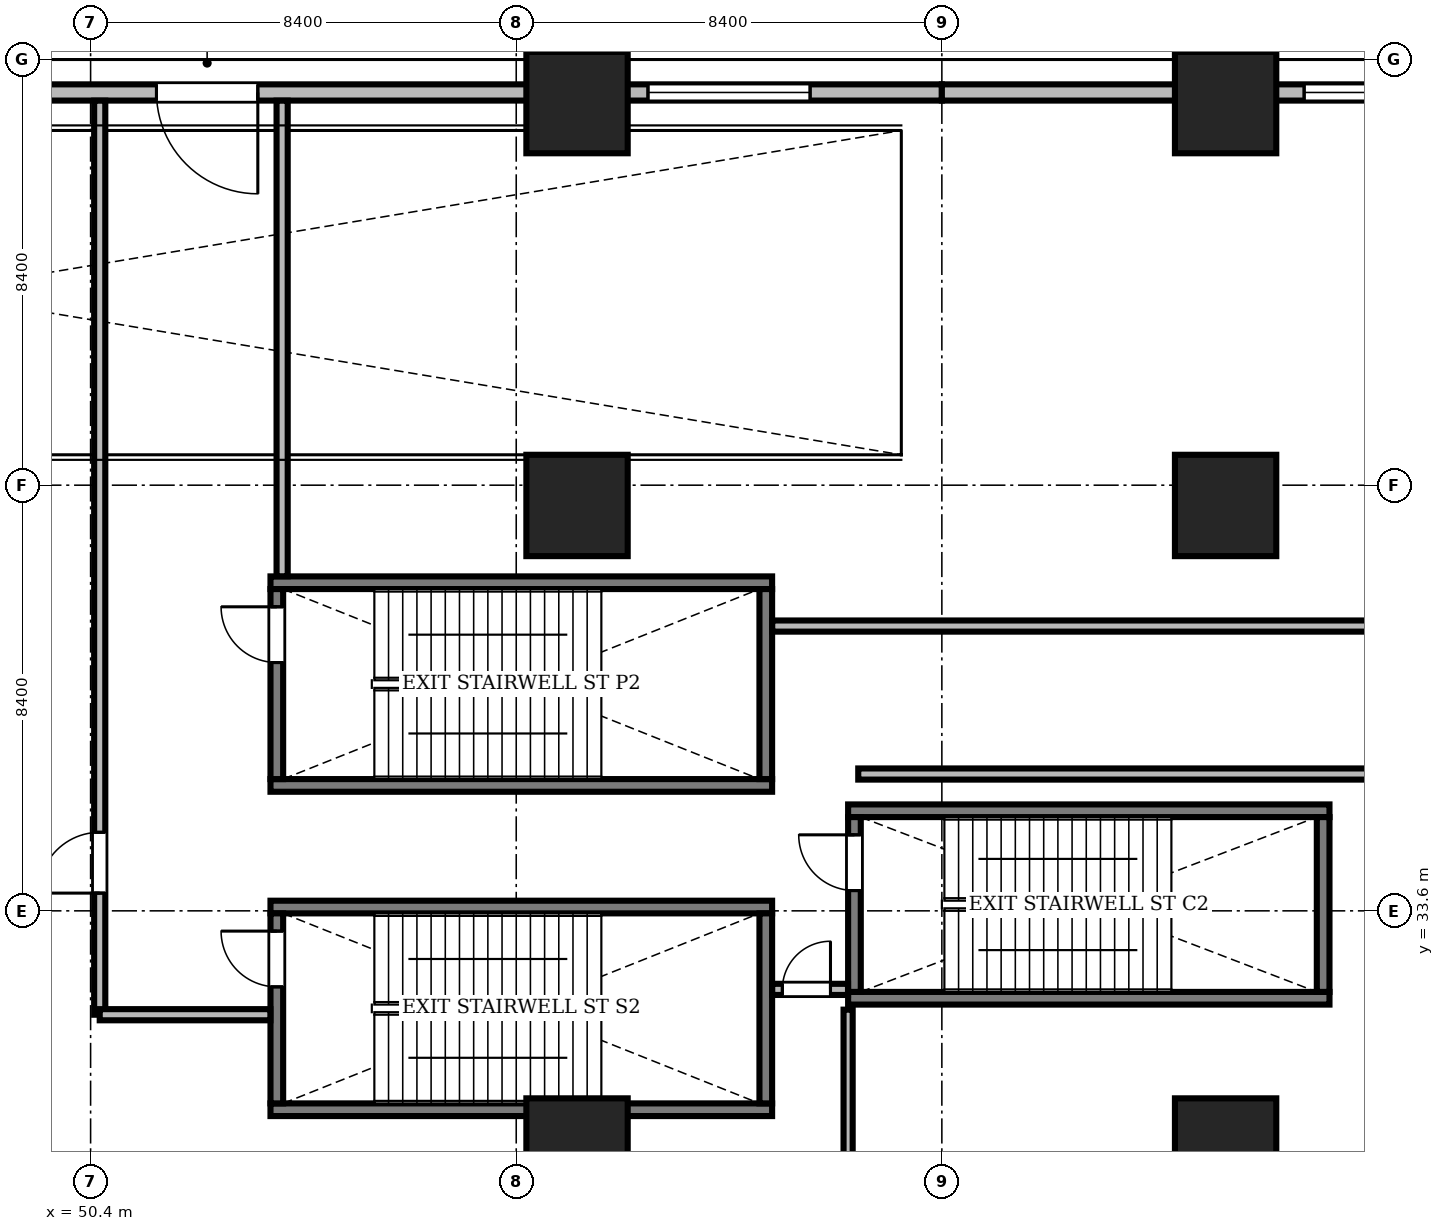
"""IFC4 building model, lengths in metres.
Left out: names, types, materials, properties, quantities, classifications, styles, units other than length and angle.
Written with IfcOpenShell. Run it as: python <this file> out.ifc"""

import sys

from ifc_helpers import new_model, si_unit, direction, frame, frame_2d, origin, origin_2d, place, context, subcontext, project, spatial, rectangle, extrude, source, transform, mapped, element, fill, save


model = new_model("IFC4")
c1 = context("Model", 3, precision=1e-05, world=origin(), true_north=direction((0.0, 1.0)))
c2 = subcontext(c1, "Body", "Model", "MODEL_VIEW")
j1 = project(units=[si_unit("LENGTHUNIT", "METRE"), si_unit("PLANEANGLEUNIT", "RADIAN")], contexts=[c1])
p1 = place(None, origin())
s1 = spatial("IfcSite", under=j1, at=p1, CompositionType="ELEMENT")
p2 = place(p1, origin())
s2 = spatial("IfcBuilding", under=s1, at=p2, CompositionType="ELEMENT")
p3 = place(p2, origin())
s3 = spatial("IfcBuildingStorey", under=s2, at=p3, CompositionType="ELEMENT", Elevation=0.0)
m1 = source(origin(), c2, "Body", "SweptSolid", [
    extrude(rectangle(XDim=2.0, YDim=2.0, at=origin_2d()), origin(), (0.0, 0.0, 1.0), 5.68),
])
for number, where, z_axis, x_axis in (
    (1, (60.0, 28.9, 0.0), (0.0, 0.0, 1.0), (1.0, 0.0, 0.0)),
    (2, (72.8, 28.9, 0.0), (0.0, 0.0, 1.0), (1.0, 0.0, 0.0)),
    (3, (60.0, 41.6, 0.0), (0.0, 0.0, 1.0), (1.0, 0.0, 0.0)),
    (4, (72.8, 41.6, 0.0), (0.0, 0.0, 1.0), (1.0, 0.0, 0.0)),
    (5, (60.0, 49.55, 0.0), (0.0, 0.0, 1.0), (1.0, 0.0, 0.0)),
    (6, (72.8, 49.55, 0.0), (0.0, 0.0, 1.0), (1.0, 0.0, 0.0)),
):
    element("IfcColumn", number, at=place(p3, frame(where, z_axis=z_axis, x_axis=x_axis)), inside=s3, PredefinedType="COLUMN", context=c2, shape_type="MappedRepresentation", body=[
        mapped(m1, transform((0.0, 0.0, 0.0), scale=1.0)),
    ])
m2 = source(origin(), c2, "Body", "SweptSolid", [
    extrude(rectangle(XDim=40.0, YDim=0.32, at=frame_2d((20.0, 0.0))), origin(), (0.0, 0.0, 1.0), 5.151),
])
p4 = place(p3, frame((67.2, 49.75, 0.0), z_axis=(0.0, 0.0, 1.0), x_axis=(-1.0, 0.0, 0.0)))
e7 = element("IfcWall", 7, at=p4, inside=s3, PredefinedType="SOLIDWALL", context=c2, shape_type="MappedRepresentation", body=[
    mapped(m2, transform((0.0, 0.0, 0.0), scale=1.0)),
])
m3 = source(origin(), c2, "Body", "SweptSolid", [
    extrude(rectangle(XDim=2.0, YDim=2.6, at=frame_2d((1.0, 1.3))), frame((0.0, 0.17, 0.0), z_axis=(0.0, -1.0, 0.0), x_axis=(1.0, 0.0, 0.0)), (0.0, 0.0, 1.0), 0.34),
])
p5 = place(p4, frame((13.5, 0.0, 0.0)))
e8 = element("IfcOpeningElement", 8, at=p5, cuts=e7, PredefinedType="OPENING", context=c2, shape_type="MappedRepresentation", body=[
    mapped(m3, transform((0.0, 0.0, 0.0), scale=1.0)),
])
m4 = source(origin(), c2, "Body", "SweptSolid", [
    extrude(rectangle(XDim=3.2, YDim=3.4, at=frame_2d((1.6, 1.7))), frame((0.0, 0.17, 0.0), z_axis=(0.0, -1.0, 0.0), x_axis=(1.0, 0.0, 0.0)), (0.0, 0.0, 1.0), 0.34),
])
p6 = place(p4, frame((2.6, 0.0, 0.85)))
e9 = element("IfcOpeningElement", 9, at=p6, cuts=e7, PredefinedType="OPENING", context=c2, shape_type="MappedRepresentation", body=[
    mapped(m4, transform((0.0, 0.0, 0.0), scale=1.0)),
])
m5 = source(origin(), c2, "Body", "SweptSolid", [
    extrude(rectangle(XDim=16.15, YDim=0.32, at=frame_2d((8.075, 0.0))), origin(), (0.0, 0.0, 1.0), 5.151),
])
p7 = place(p3, frame((83.35, 49.75, 0.0), z_axis=(0.0, 0.0, 1.0), x_axis=(-1.0, 0.0, 0.0)))
e10 = element("IfcWall", 10, at=p7, inside=s3, PredefinedType="SOLIDWALL", context=c2, shape_type="MappedRepresentation", body=[
    mapped(m5, transform((0.0, 0.0, 0.0), scale=1.0)),
])
p8 = place(p7, frame((3.2, 0.0, 0.0)))
e11 = element("IfcOpeningElement", 11, at=p8, cuts=e10, PredefinedType="OPENING", context=c2, shape_type="MappedRepresentation", body=[
    mapped(m3, transform((0.0, 0.0, 0.0), scale=1.0)),
])
p9 = place(p7, frame((5.8, 0.0, 0.85)))
e12 = element("IfcOpeningElement", 12, at=p9, cuts=e10, PredefinedType="OPENING", context=c2, shape_type="MappedRepresentation", body=[
    mapped(m4, transform((0.0, 0.0, 0.0), scale=1.0)),
])
m6 = source(origin(), c2, "Body", "SweptSolid", [
    extrude(rectangle(XDim=9.9, YDim=0.25, at=frame_2d((4.95, 0.0))), origin(), (0.0, 0.0, 1.0), 5.8),
])
for number, where, z_axis, x_axis in (
    (13, (53.95, 29.675, 0.0), (0.0, 0.0, 1.0), (1.0, 0.0, 0.0)),
    (14, (53.95, 33.675, 0.0), (0.0, 0.0, 1.0), (1.0, 0.0, 0.0)),
):
    element("IfcWall", number, at=place(p3, frame(where, z_axis=z_axis, x_axis=x_axis)), inside=s3, PredefinedType="SOLIDWALL", context=c2, shape_type="MappedRepresentation", body=[
        mapped(m6, transform((0.0, 0.0, 0.0), scale=1.0)),
    ])
m7 = source(origin(), c2, "Body", "SweptSolid", [
    extrude(rectangle(XDim=3.75, YDim=0.25, at=frame_2d((1.875, 0.0))), origin(), (0.0, 0.0, 1.0), 5.8),
])
p10 = place(p3, frame((63.725, 29.8, 0.0), z_axis=(0.0, 0.0, 1.0), x_axis=(0.0, 1.0, 0.0)))
e15 = element("IfcWall", 15, at=p10, inside=s3, PredefinedType="SOLIDWALL", context=c2, shape_type="MappedRepresentation", body=[
    mapped(m7, transform((0.0, 0.0, 0.0), scale=1.0)),
])
p11 = place(p3, frame((54.075, 29.8, 0.0), z_axis=(0.0, 0.0, 1.0), x_axis=(0.0, 1.0, 0.0)))
e16 = element("IfcWall", 16, at=p11, inside=s3, PredefinedType="SOLIDWALL", context=c2, shape_type="MappedRepresentation", body=[
    mapped(m7, transform((0.0, 0.0, 0.0), scale=1.0)),
])
m8 = source(origin(), c2, "Body", "SweptSolid", [
    extrude(rectangle(XDim=1.1, YDim=2.2, at=frame_2d((0.55, 1.1))), frame((0.0, 0.135, 0.0), z_axis=(0.0, -1.0, 0.0), x_axis=(1.0, 0.0, 0.0)), (0.0, 0.0, 1.0), 0.27),
])
p12 = place(p11, frame((2.3, 0.0, 0.0)))
e17 = element("IfcOpeningElement", 17, at=p12, cuts=e16, PredefinedType="OPENING", context=c2, shape_type="MappedRepresentation", body=[
    mapped(m8, transform((0.0, 0.0, 0.0), scale=1.0)),
])
for number, where, z_axis, x_axis in (
    (18, (53.95, 36.075, 0.0), (0.0, 0.0, 1.0), (1.0, 0.0, 0.0)),
    (19, (53.95, 40.075, 0.0), (0.0, 0.0, 1.0), (1.0, 0.0, 0.0)),
):
    element("IfcWall", number, at=place(p3, frame(where, z_axis=z_axis, x_axis=x_axis)), inside=s3, PredefinedType="SOLIDWALL", context=c2, shape_type="MappedRepresentation", body=[
        mapped(m6, transform((0.0, 0.0, 0.0), scale=1.0)),
    ])
p13 = place(p3, frame((63.725, 36.2, 0.0), z_axis=(0.0, 0.0, 1.0), x_axis=(0.0, 1.0, 0.0)))
e20 = element("IfcWall", 20, at=p13, inside=s3, PredefinedType="SOLIDWALL", context=c2, shape_type="MappedRepresentation", body=[
    mapped(m7, transform((0.0, 0.0, 0.0), scale=1.0)),
])
p14 = place(p3, frame((54.075, 36.2, 0.0), z_axis=(0.0, 0.0, 1.0), x_axis=(0.0, 1.0, 0.0)))
e21 = element("IfcWall", 21, at=p14, inside=s3, PredefinedType="SOLIDWALL", context=c2, shape_type="MappedRepresentation", body=[
    mapped(m7, transform((0.0, 0.0, 0.0), scale=1.0)),
])
p15 = place(p14, frame((2.3, 0.0, 0.0)))
e22 = element("IfcOpeningElement", 22, at=p15, cuts=e21, PredefinedType="OPENING", context=c2, shape_type="MappedRepresentation", body=[
    mapped(m8, transform((0.0, 0.0, 0.0), scale=1.0)),
])
m9 = source(origin(), c2, "Body", "SweptSolid", [
    extrude(rectangle(XDim=9.5, YDim=0.25, at=frame_2d((4.75, 0.0))), origin(), (0.0, 0.0, 1.0), 5.8),
])
for number, where, z_axis, x_axis in (
    (23, (65.35, 31.875, 0.0), (0.0, 0.0, 1.0), (1.0, 0.0, 0.0)),
    (24, (65.35, 35.575, 0.0), (0.0, 0.0, 1.0), (1.0, 0.0, 0.0)),
):
    element("IfcWall", number, at=place(p3, frame(where, z_axis=z_axis, x_axis=x_axis)), inside=s3, PredefinedType="SOLIDWALL", context=c2, shape_type="MappedRepresentation", body=[
        mapped(m9, transform((0.0, 0.0, 0.0), scale=1.0)),
    ])
m10 = source(origin(), c2, "Body", "SweptSolid", [
    extrude(rectangle(XDim=3.45, YDim=0.25, at=frame_2d((1.725, 0.0))), origin(), (0.0, 0.0, 1.0), 5.8),
])
p16 = place(p3, frame((74.725, 32.0, 0.0), z_axis=(0.0, 0.0, 1.0), x_axis=(0.0, 1.0, 0.0)))
e25 = element("IfcWall", 25, at=p16, inside=s3, PredefinedType="SOLIDWALL", context=c2, shape_type="MappedRepresentation", body=[
    mapped(m10, transform((0.0, 0.0, 0.0), scale=1.0)),
])
p17 = place(p3, frame((65.475, 32.0, 0.0), z_axis=(0.0, 0.0, 1.0), x_axis=(0.0, 1.0, 0.0)))
e26 = element("IfcWall", 26, at=p17, inside=s3, PredefinedType="SOLIDWALL", context=c2, shape_type="MappedRepresentation", body=[
    mapped(m10, transform((0.0, 0.0, 0.0), scale=1.0)),
])
p18 = place(p17, frame((2.0, 0.0, 0.0)))
e27 = element("IfcOpeningElement", 27, at=p18, cuts=e26, PredefinedType="OPENING", context=c2, shape_type="MappedRepresentation", body=[
    mapped(m8, transform((0.0, 0.0, 0.0), scale=1.0)),
])
m11 = source(origin(), c2, "Body", "SweptSolid", [
    extrude(rectangle(XDim=18.038, YDim=0.22, at=frame_2d((9.019, 0.0))), origin(), (0.0, 0.0, 1.0), 5.148),
])
p19 = place(p3, frame((50.58, 31.55, 0.0), z_axis=(0.0, 0.0, 1.0), x_axis=(0.0, 1.0, 0.0)))
e28 = element("IfcWall", 28, at=p19, inside=s3, PredefinedType="SOLIDWALL", context=c2, shape_type="MappedRepresentation", body=[
    mapped(m11, transform((0.0, 0.0, 0.0), scale=1.0)),
])
m12 = source(origin(), c2, "Body", "SweptSolid", [
    extrude(rectangle(XDim=1.2, YDim=2.2, at=frame_2d((0.6, 1.1))), frame((0.0, 0.12, 0.0), z_axis=(0.0, -1.0, 0.0), x_axis=(1.0, 0.0, 0.0)), (0.0, 0.0, 1.0), 0.24),
])
p20 = place(p19, frame((2.4, 0.0, 0.0)))
e29 = element("IfcOpeningElement", 29, at=p20, cuts=e28, PredefinedType="OPENING", context=c2, shape_type="MappedRepresentation", body=[
    mapped(m12, transform((0.0, 0.0, 0.0), scale=1.0)),
])
m13 = source(origin(), c2, "Body", "SweptSolid", [
    extrude(rectangle(XDim=7.15, YDim=0.18, at=frame_2d((3.575, 0.0))), origin(), (0.0, 0.0, 1.0), 5.148),
])
p21 = place(p3, frame((65.35, 24.5, 0.0), z_axis=(0.0, 0.0, 1.0), x_axis=(0.0, 1.0, 0.0)))
e30 = element("IfcWall", 30, at=p21, inside=s3, PredefinedType="PARTITIONING", context=c2, shape_type="MappedRepresentation", body=[
    mapped(m13, transform((0.0, 0.0, 0.0), scale=1.0)),
])
m14 = source(origin(), c2, "Body", "SweptSolid", [
    extrude(rectangle(XDim=1.5, YDim=2.3, at=frame_2d((0.75, 1.15))), frame((0.0, 0.1, 0.0), z_axis=(0.0, -1.0, 0.0), x_axis=(1.0, 0.0, 0.0)), (0.0, 0.0, 1.0), 0.2),
])
p22 = place(p21, frame((2.2, 0.0, 0.0)))
e31 = element("IfcOpeningElement", 31, at=p22, cuts=e30, PredefinedType="OPENING", context=c2, shape_type="MappedRepresentation", body=[
    mapped(m14, transform((0.0, 0.0, 0.0), scale=1.0)),
])
m15 = source(origin(), c2, "Body", "SweptSolid", [
    extrude(rectangle(XDim=1.496, YDim=0.22, at=frame_2d((0.748, 0.0))), origin(), (0.0, 0.0, 1.0), 5.68),
])
p23 = place(p3, frame((63.852, 32.05, 0.0), z_axis=(0.0, 0.0, 1.0), x_axis=(1.0, 0.0, 0.0)))
e32 = element("IfcWall", 32, at=p23, inside=s3, PredefinedType="SOLIDWALL", context=c2, shape_type="MappedRepresentation", body=[
    mapped(m15, transform((0.0, 0.0, 0.0), scale=1.0)),
])
m16 = source(origin(), c2, "Body", "SweptSolid", [
    extrude(rectangle(XDim=0.95, YDim=2.15, at=frame_2d((0.475, 1.075))), frame((0.0, 0.12, 0.0), z_axis=(0.0, -1.0, 0.0), x_axis=(1.0, 0.0, 0.0)), (0.0, 0.0, 1.0), 0.24),
])
p24 = place(p23, frame((0.2, 0.0, 0.0)))
e33 = element("IfcOpeningElement", 33, at=p24, cuts=e32, PredefinedType="OPENING", context=c2, shape_type="MappedRepresentation", body=[
    mapped(m16, transform((0.0, 0.0, 0.0), scale=1.0)),
])
m17 = source(origin(), c2, "Body", "SweptSolid", [
    extrude(rectangle(XDim=19.336, YDim=0.22, at=frame_2d((9.668, 0.0))), origin(), (0.0, 0.0, 1.0), 5.072),
])
p25 = place(p3, frame((63.852, 39.22, 0.0), z_axis=(0.0, 0.0, 1.0), x_axis=(1.0, 0.0, 0.0)))
e34 = element("IfcWall", 34, at=p25, inside=s3, PredefinedType="SOLIDWALL", context=c2, shape_type="MappedRepresentation", body=[
    mapped(m17, transform((0.0, 0.0, 0.0), scale=1.0)),
])
m18 = source(origin(), c2, "Body", "SweptSolid", [
    extrude(rectangle(XDim=17.638, YDim=0.22, at=frame_2d((8.819, 0.0))), origin(), (0.0, 0.0, 1.0), 5.072),
])
p26 = place(p3, frame((65.55, 36.3, 0.0), z_axis=(0.0, 0.0, 1.0), x_axis=(1.0, 0.0, 0.0)))
e35 = element("IfcWall", 35, at=p26, inside=s3, PredefinedType="SOLIDWALL", context=c2, shape_type="MappedRepresentation", body=[
    mapped(m18, transform((0.0, 0.0, 0.0), scale=1.0)),
])
m19 = source(origin(), c2, "Body", "SweptSolid", [
    extrude(rectangle(XDim=9.386, YDim=0.22, at=frame_2d((4.693, 0.0))), origin(), (0.0, 0.0, 1.0), 5.148),
])
p27 = place(p3, frame((54.18, 40.202, 0.0), z_axis=(0.0, 0.0, 1.0), x_axis=(0.0, 1.0, 0.0)))
e36 = element("IfcWall", 36, at=p27, inside=s3, PredefinedType="SOLIDWALL", context=c2, shape_type="MappedRepresentation", body=[
    mapped(m19, transform((0.0, 0.0, 0.0), scale=1.0)),
])
m20 = source(origin(), c2, "Body", "SweptSolid", [
    extrude(rectangle(XDim=3.368, YDim=0.22, at=frame_2d((1.684, 0.0))), origin(), (0.0, 0.0, 1.0), 5.68),
])
p28 = place(p3, frame((50.58, 31.55, 0.0), z_axis=(0.0, 0.0, 1.0), x_axis=(1.0, 0.0, 0.0)))
e37 = element("IfcWall", 37, at=p28, inside=s3, PredefinedType="SOLIDWALL", context=c2, shape_type="MappedRepresentation", body=[
    mapped(m20, transform((0.0, 0.0, 0.0), scale=1.0)),
])
m21 = source(origin(), c2, "Body", "SweptSolid", [
    extrude(rectangle(XDim=2.0, YDim=2.6, at=frame_2d((1.0, 1.3))), frame((0.0, 0.025, 0.0), z_axis=(0.0, -1.0, 0.0), x_axis=(1.0, 0.0, 0.0)), (0.0, 0.0, 1.0), 0.05),
])
p29 = place(p5, frame((2.0, 0.0, 0.0), z_axis=(0.0, 0.0, 1.0), x_axis=(-1.0, 0.0, 0.0)))
e38 = element("IfcDoor", 38, at=p29, inside=s3, OperationType="DOUBLE_DOOR_SINGLE_SWING", PredefinedType="DOOR", context=c2, shape_type="MappedRepresentation", body=[
    mapped(m21, transform((0.0, 0.0, 0.0), scale=1.0)),
])
fill(e8, e38)
m22 = source(origin(), c2, "Body", "SweptSolid", [
    extrude(rectangle(XDim=3.2, YDim=3.4, at=frame_2d((1.6, 1.7))), frame((0.0, 0.03, 0.0), z_axis=(0.0, -1.0, 0.0), x_axis=(1.0, 0.0, 0.0)), (0.0, 0.0, 1.0), 0.06),
])
p30 = place(p6, origin())
e39 = element("IfcWindow", 39, at=p30, inside=s3, PartitioningType="SINGLE_PANEL", PredefinedType="WINDOW", context=c2, shape_type="MappedRepresentation", body=[
    mapped(m22, transform((0.0, 0.0, 0.0), scale=1.0)),
])
fill(e9, e39)
p31 = place(p9, origin())
e40 = element("IfcWindow", 40, at=p31, inside=s3, PartitioningType="SINGLE_PANEL", PredefinedType="WINDOW", context=c2, shape_type="MappedRepresentation", body=[
    mapped(m22, transform((0.0, 0.0, 0.0), scale=1.0)),
])
fill(e12, e40)
m23 = source(origin(), c2, "Body", "SweptSolid", [
    extrude(rectangle(XDim=1.1, YDim=2.2, at=frame_2d((0.55, 1.1))), frame((0.0, 0.025, 0.0), z_axis=(0.0, -1.0, 0.0), x_axis=(1.0, 0.0, 0.0)), (0.0, 0.0, 1.0), 0.05),
])
p32 = place(p12, origin())
e41 = element("IfcDoor", 41, at=p32, inside=s3, OperationType="SINGLE_SWING_RIGHT", PredefinedType="DOOR", context=c2, shape_type="MappedRepresentation", body=[
    mapped(m23, transform((0.0, 0.0, 0.0), scale=1.0)),
])
fill(e17, e41)
p33 = place(p15, origin())
e42 = element("IfcDoor", 42, at=p33, inside=s3, OperationType="SINGLE_SWING_RIGHT", PredefinedType="DOOR", context=c2, shape_type="MappedRepresentation", body=[
    mapped(m23, transform((0.0, 0.0, 0.0), scale=1.0)),
])
fill(e22, e42)
p34 = place(p18, origin())
e43 = element("IfcDoor", 43, at=p34, inside=s3, OperationType="SINGLE_SWING_RIGHT", PredefinedType="DOOR", context=c2, shape_type="MappedRepresentation", body=[
    mapped(m23, transform((0.0, 0.0, 0.0), scale=1.0)),
])
fill(e27, e43)
m24 = source(origin(), c2, "Body", "SweptSolid", [
    extrude(rectangle(XDim=1.2, YDim=2.2, at=frame_2d((0.6, 1.1))), frame((0.0, 0.025, 0.0), z_axis=(0.0, -1.0, 0.0), x_axis=(1.0, 0.0, 0.0)), (0.0, 0.0, 1.0), 0.05),
])
p35 = place(p20, origin())
e44 = element("IfcDoor", 44, at=p35, inside=s3, OperationType="SINGLE_SWING_LEFT", PredefinedType="DOOR", context=c2, shape_type="MappedRepresentation", body=[
    mapped(m24, transform((0.0, 0.0, 0.0), scale=1.0)),
])
fill(e29, e44)
m25 = source(origin(), c2, "Body", "SweptSolid", [
    extrude(rectangle(XDim=0.95, YDim=2.15, at=frame_2d((0.475, 1.075))), frame((0.0, 0.025, 0.0), z_axis=(0.0, -1.0, 0.0), x_axis=(1.0, 0.0, 0.0)), (0.0, 0.0, 1.0), 0.05),
])
p36 = place(p24, origin())
e45 = element("IfcDoor", 45, at=p36, inside=s3, OperationType="SINGLE_SWING_RIGHT", PredefinedType="DOOR", context=c2, shape_type="MappedRepresentation", body=[
    mapped(m25, transform((0.0, 0.0, 0.0), scale=1.0)),
])
fill(e33, e45)
save(model, sys.argv[1])
